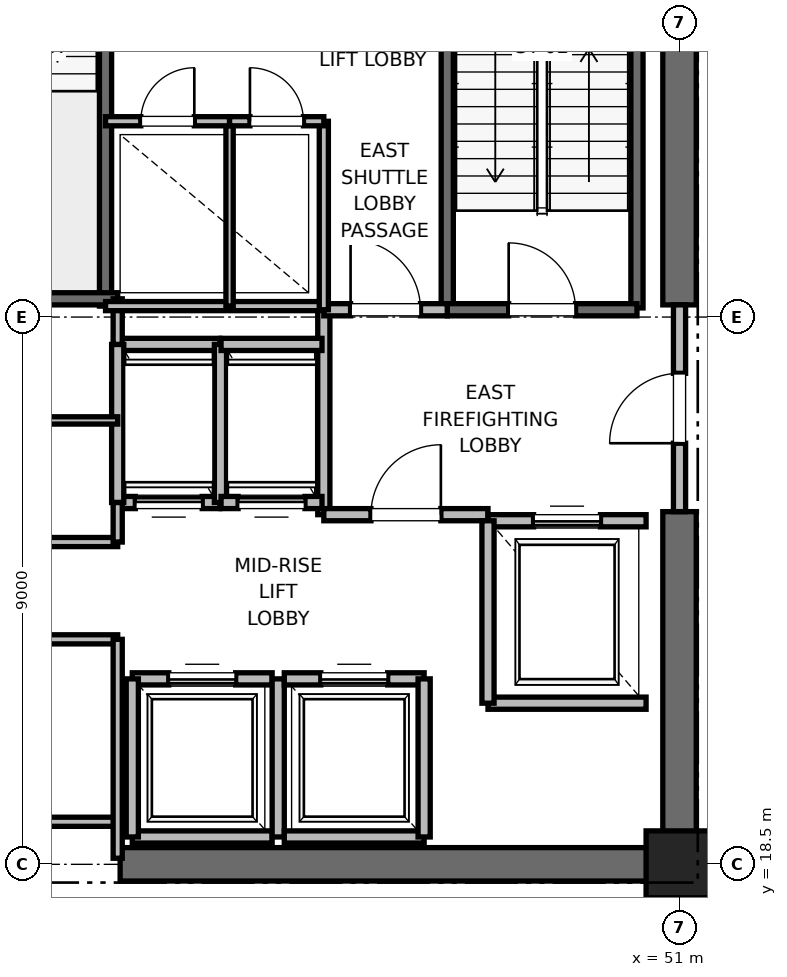
"""IFC4 building model, lengths in metres.
Left out: names, types, materials, properties, quantities, classifications, styles, units other than length and angle.
Written with IfcOpenShell. Run it as: python <this file> out.ifc"""

import sys

from ifc_helpers import new_model, si_unit, direction, frame, frame_2d, origin, origin_2d, place, context, subcontext, project, spatial, rectangle, extrude, element, fill, save


model = new_model("IFC4")
c1 = context("Model", 3, precision=1e-05, world=origin(), true_north=direction((0.0, 1.0)))
c2 = subcontext(c1, "Body", "Model", "MODEL_VIEW")
j1 = project(units=[si_unit("LENGTHUNIT", "METRE"), si_unit("PLANEANGLEUNIT", "RADIAN")], contexts=[c1])
p1 = place(None, origin())
s1 = spatial("IfcSite", under=j1, at=p1, CompositionType="ELEMENT")
p2 = place(p1, origin())
s2 = spatial("IfcBuilding", under=s1, at=p2, CompositionType="ELEMENT")
p3 = place(p2, frame((0.0, 0.0, 160.4)))
s3 = spatial("IfcBuildingStorey", under=s2, at=p3, CompositionType="ELEMENT", Elevation=160.4)
p4 = place(p3, frame((51.0, 18.5, 0.0), z_axis=(0.0, 0.0, 1.0), x_axis=(1.0, 0.0, 0.0)))
e1 = element("IfcColumn", 1, at=p4, inside=s3, PredefinedType="PILASTER", context=c2, shape_type="SweptSolid", body=[
    extrude(rectangle(XDim=1.1, YDim=1.1, at=origin_2d()), origin(), (0.0, 0.0, 1.0), 4.0),
])
p5 = place(p3, frame((41.8, 18.5, 0.0), z_axis=(0.0, 0.0, 1.0), x_axis=(1.0, 0.0, 0.0)))
e2 = element("IfcWall", 2, at=p5, inside=s3, PredefinedType="SHEAR", context=c2, shape_type="SweptSolid", body=[
    extrude(rectangle(XDim=9.2, YDim=0.55, at=frame_2d((4.6, 0.0))), origin(), (0.0, 0.0, 1.0), 3.775),
])
p6 = place(p3, frame((51.0, 18.5, 0.0), z_axis=(0.0, 0.0, 1.0), x_axis=(0.0, 1.0, 0.0)))
e3 = element("IfcWall", 3, at=p6, inside=s3, PredefinedType="SHEAR", context=c2, shape_type="SweptSolid", body=[
    extrude(rectangle(XDim=5.8, YDim=0.55, at=frame_2d((2.9, 0.0))), origin(), (0.0, 0.0, 1.0), 3.775),
])
p7 = place(p3, frame((51.0, 27.7, 0.0), z_axis=(0.0, 0.0, 1.0), x_axis=(0.0, 1.0, 0.0)))
e4 = element("IfcWall", 4, at=p7, inside=s3, PredefinedType="SHEAR", context=c2, shape_type="SweptSolid", body=[
    extrude(rectangle(XDim=8.8, YDim=0.55, at=frame_2d((4.4, 0.0))), origin(), (0.0, 0.0, 1.0), 3.775),
])
p8 = place(p3, frame((50.3, 27.65, 0.0), z_axis=(0.0, 0.0, 1.0), x_axis=(0.0, 1.0, 0.0)))
e5 = element("IfcWall", 5, at=p8, inside=s3, PredefinedType="SOLIDWALL", context=c2, shape_type="SweptSolid", body=[
    extrude(rectangle(XDim=8.15, YDim=0.2, at=frame_2d((4.075, 0.0))), origin(), (0.0, 0.0, 1.0), 3.775),
])
p9 = place(p3, frame((47.18, 27.62, 0.0), z_axis=(0.0, 0.0, 1.0), x_axis=(0.0, 1.0, 0.0)))
e6 = element("IfcWall", 6, at=p9, inside=s3, PredefinedType="SOLIDWALL", context=c2, shape_type="SweptSolid", body=[
    extrude(rectangle(XDim=8.18, YDim=0.2, at=frame_2d((4.09, 0.0))), origin(), (0.0, 0.0, 1.0), 3.775),
])
p10 = place(p3, frame((47.18, 27.62, 0.0), z_axis=(0.0, 0.0, 1.0), x_axis=(1.0, 0.0, 0.0)))
e7 = element("IfcWall", 7, at=p10, inside=s3, PredefinedType="SOLIDWALL", context=c2, shape_type="SweptSolid", body=[
    extrude(rectangle(XDim=3.12, YDim=0.2, at=frame_2d((1.56, 0.0))), origin(), (0.0, 0.0, 1.0), 3.775),
])
p11 = place(p10, frame((1.01, 0.0, 0.0)))
e8 = element("IfcOpeningElement", 8, at=p11, cuts=e7, PredefinedType="OPENING", context=c2, shape_type="SweptSolid", body=[
    extrude(rectangle(XDim=1.1, YDim=2.15, at=frame_2d((0.55, 1.075))), frame((0.0, 0.1, 0.0), z_axis=(0.0, -1.0, 0.0), x_axis=(1.0, 0.0, 0.0)), (0.0, 0.0, 1.0), 0.2),
])
p12 = place(p3, frame((41.56, 27.68, 0.0), z_axis=(0.0, 0.0, 1.0), x_axis=(0.0, 1.0, 0.0)))
e9 = element("IfcWall", 9, at=p12, inside=s3, PredefinedType="SOLIDWALL", context=c2, shape_type="SweptSolid", body=[
    extrude(rectangle(XDim=8.57, YDim=0.2, at=frame_2d((4.285, 0.0))), origin(), (0.0, 0.0, 1.0), 3.775),
])
p13 = place(p3, frame((38.44, 27.8, 0.0), z_axis=(0.0, 0.0, 1.0), x_axis=(1.0, 0.0, 0.0)))
e10 = element("IfcWall", 10, at=p13, inside=s3, PredefinedType="SOLIDWALL", context=c2, shape_type="SweptSolid", body=[
    extrude(rectangle(XDim=3.32, YDim=0.2, at=frame_2d((1.66, 0.0))), origin(), (0.0, 0.0, 1.0), 3.775),
])
p14 = place(p3, frame((45.15, 24.25, 0.0), z_axis=(0.0, 0.0, 1.0), x_axis=(0.0, 1.0, 0.0)))
e11 = element("IfcWall", 11, at=p14, inside=s3, PredefinedType="PARTITIONING", context=c2, shape_type="SweptSolid", body=[
    extrude(rectangle(XDim=3.37, YDim=0.2, at=frame_2d((1.685, 0.0))), origin(), (0.0, 0.0, 1.0), 3.775),
])
p15 = place(p3, frame((45.15, 24.25, 0.0), z_axis=(0.0, 0.0, 1.0), x_axis=(1.0, 0.0, 0.0)))
e12 = element("IfcWall", 12, at=p15, inside=s3, PredefinedType="PARTITIONING", context=c2, shape_type="SweptSolid", body=[
    extrude(rectangle(XDim=2.7, YDim=0.2, at=frame_2d((1.35, 0.0))), origin(), (0.0, 0.0, 1.0), 3.775),
])
p16 = place(p15, frame((0.775, 0.0, 0.0)))
e13 = element("IfcOpeningElement", 13, at=p16, cuts=e12, PredefinedType="OPENING", context=c2, shape_type="SweptSolid", body=[
    extrude(rectangle(XDim=1.15, YDim=2.2, at=frame_2d((0.575, 1.1))), frame((0.0, 0.1, 0.0), z_axis=(0.0, -1.0, 0.0), x_axis=(1.0, 0.0, 0.0)), (0.0, 0.0, 1.0), 0.2),
])
p17 = place(p3, frame((45.15, 27.62, 0.0), z_axis=(0.0, 0.0, 1.0), x_axis=(1.0, 0.0, 0.0)))
e14 = element("IfcWall", 14, at=p17, inside=s3, PredefinedType="PARTITIONING", context=c2, shape_type="SweptSolid", body=[
    extrude(rectangle(XDim=2.03, YDim=0.2, at=frame_2d((1.015, 0.0))), origin(), (0.0, 0.0, 1.0), 3.775),
])
p18 = place(p17, frame((0.44, 0.0, 0.0)))
e15 = element("IfcOpeningElement", 15, at=p18, cuts=e14, PredefinedType="OPENING", context=c2, shape_type="SweptSolid", body=[
    extrude(rectangle(XDim=1.15, YDim=2.2, at=frame_2d((0.575, 1.1))), frame((0.0, 0.1, 0.0), z_axis=(0.0, -1.0, 0.0), x_axis=(1.0, 0.0, 0.0)), (0.0, 0.0, 1.0), 0.2),
])
p19 = place(p3, frame((51.0, 24.3, 0.0), z_axis=(0.0, 0.0, 1.0), x_axis=(0.0, 1.0, 0.0)))
e16 = element("IfcWall", 16, at=p19, inside=s3, PredefinedType="PARTITIONING", context=c2, shape_type="SweptSolid", body=[
    extrude(rectangle(XDim=3.4, YDim=0.2, at=frame_2d((1.7, 0.0))), origin(), (0.0, 0.0, 1.0), 2.755),
])
p20 = place(p19, frame((1.125, 0.0, 0.0)))
e17 = element("IfcOpeningElement", 17, at=p20, cuts=e16, PredefinedType="OPENING", context=c2, shape_type="SweptSolid", body=[
    extrude(rectangle(XDim=1.15, YDim=2.2, at=frame_2d((0.575, 1.1))), frame((0.0, 0.1, 0.0), z_axis=(0.0, -1.0, 0.0), x_axis=(1.0, 0.0, 0.0)), (0.0, 0.0, 1.0), 0.2),
])
p21 = place(p3, frame((47.85, 21.15, 0.0), z_axis=(0.0, 0.0, 1.0), x_axis=(1.0, 0.0, 0.0)))
e18 = element("IfcWall", 18, at=p21, inside=s3, PredefinedType="SOLIDWALL", context=c2, shape_type="SweptSolid", body=[
    extrude(rectangle(XDim=2.6, YDim=0.2, at=frame_2d((1.3, 0.0))), origin(), (0.0, 0.0, 1.0), 3.775),
])
p22 = place(p3, frame((50.45, 24.15, 0.0), z_axis=(0.0, 0.0, 1.0), x_axis=(-1.0, 0.0, 0.0)))
e19 = element("IfcWall", 19, at=p22, inside=s3, PredefinedType="SOLIDWALL", context=c2, shape_type="SweptSolid", body=[
    extrude(rectangle(XDim=2.6, YDim=0.2, at=frame_2d((1.3, 0.0))), origin(), (0.0, 0.0, 1.0), 2.755),
])
p23 = place(p22, frame((0.75, 0.0, 0.0)))
e20 = element("IfcOpeningElement", 20, at=p23, cuts=e19, PredefinedType="OPENING", context=c2, shape_type="SweptSolid", body=[
    extrude(rectangle(XDim=1.1, YDim=2.2, at=frame_2d((0.55, 1.1))), frame((0.0, 0.1, 0.0), z_axis=(0.0, -1.0, 0.0), x_axis=(1.0, 0.0, 0.0)), (0.0, 0.0, 1.0), 0.2),
])
p24 = place(p3, frame((47.85, 24.15, 0.0), z_axis=(0.0, 0.0, 1.0), x_axis=(0.0, -1.0, 0.0)))
e21 = element("IfcWall", 21, at=p24, inside=s3, PredefinedType="SOLIDWALL", context=c2, shape_type="SweptSolid", body=[
    extrude(rectangle(XDim=3.0, YDim=0.2, at=frame_2d((1.5, 0.0))), origin(), (0.0, 0.0, 1.0), 3.775),
])
p25 = place(p3, frame((42.0, 18.95, 0.0), z_axis=(0.0, 0.0, 1.0), x_axis=(1.0, 0.0, 0.0)))
e22 = element("IfcWall", 22, at=p25, inside=s3, PredefinedType="SOLIDWALL", context=c2, shape_type="SweptSolid", body=[
    extrude(rectangle(XDim=2.3, YDim=0.2, at=frame_2d((1.15, 0.0))), origin(), (0.0, 0.0, 1.0), 2.755),
])
p26 = place(p3, frame((44.3, 21.55, 0.0), z_axis=(0.0, 0.0, 1.0), x_axis=(-1.0, 0.0, 0.0)))
e23 = element("IfcWall", 23, at=p26, inside=s3, PredefinedType="SOLIDWALL", context=c2, shape_type="SweptSolid", body=[
    extrude(rectangle(XDim=2.3, YDim=0.2, at=frame_2d((1.15, 0.0))), origin(), (0.0, 0.0, 1.0), 3.775),
])
p27 = place(p26, frame((0.6, 0.0, 0.0)))
e24 = element("IfcOpeningElement", 24, at=p27, cuts=e23, PredefinedType="OPENING", context=c2, shape_type="SweptSolid", body=[
    extrude(rectangle(XDim=1.1, YDim=2.2, at=frame_2d((0.55, 1.1))), frame((0.0, 0.1, 0.0), z_axis=(0.0, -1.0, 0.0), x_axis=(1.0, 0.0, 0.0)), (0.0, 0.0, 1.0), 0.2),
])
p28 = place(p3, frame((42.0, 21.55, 0.0), z_axis=(0.0, 0.0, 1.0), x_axis=(0.0, -1.0, 0.0)))
e25 = element("IfcWall", 25, at=p28, inside=s3, PredefinedType="SOLIDWALL", context=c2, shape_type="SweptSolid", body=[
    extrude(rectangle(XDim=2.6, YDim=0.2, at=frame_2d((1.3, 0.0))), origin(), (0.0, 0.0, 1.0), 2.755),
])
p29 = place(p3, frame((44.4, 18.95, 0.0), z_axis=(0.0, 0.0, 1.0), x_axis=(0.0, 1.0, 0.0)))
e26 = element("IfcWall", 26, at=p29, inside=s3, PredefinedType="SOLIDWALL", context=c2, shape_type="SweptSolid", body=[
    extrude(rectangle(XDim=2.6, YDim=0.2, at=frame_2d((1.3, 0.0))), origin(), (0.0, 0.0, 1.0), 3.775),
])
p30 = place(p3, frame((44.5, 18.95, 0.0), z_axis=(0.0, 0.0, 1.0), x_axis=(1.0, 0.0, 0.0)))
e27 = element("IfcWall", 27, at=p30, inside=s3, PredefinedType="SOLIDWALL", context=c2, shape_type="SweptSolid", body=[
    extrude(rectangle(XDim=2.3, YDim=0.2, at=frame_2d((1.15, 0.0))), origin(), (0.0, 0.0, 1.0), 3.775),
])
p31 = place(p3, frame((46.8, 21.55, 0.0), z_axis=(0.0, 0.0, 1.0), x_axis=(-1.0, 0.0, 0.0)))
e28 = element("IfcWall", 28, at=p31, inside=s3, PredefinedType="SOLIDWALL", context=c2, shape_type="SweptSolid", body=[
    extrude(rectangle(XDim=2.3, YDim=0.2, at=frame_2d((1.15, 0.0))), origin(), (0.0, 0.0, 1.0), 3.775),
])
p32 = place(p31, frame((0.6, 0.0, 0.0)))
e29 = element("IfcOpeningElement", 29, at=p32, cuts=e28, PredefinedType="OPENING", context=c2, shape_type="SweptSolid", body=[
    extrude(rectangle(XDim=1.1, YDim=2.2, at=frame_2d((0.55, 1.1))), frame((0.0, 0.1, 0.0), z_axis=(0.0, -1.0, 0.0), x_axis=(1.0, 0.0, 0.0)), (0.0, 0.0, 1.0), 0.2),
])
p33 = place(p3, frame((46.8, 18.95, 0.0), z_axis=(0.0, 0.0, 1.0), x_axis=(0.0, 1.0, 0.0)))
e30 = element("IfcWall", 30, at=p33, inside=s3, PredefinedType="SOLIDWALL", context=c2, shape_type="SweptSolid", body=[
    extrude(rectangle(XDim=2.6, YDim=0.2, at=frame_2d((1.3, 0.0))), origin(), (0.0, 0.0, 1.0), 3.775),
])
p34 = place(p3, frame((41.76, 24.45, 0.0), z_axis=(0.0, 0.0, 1.0), x_axis=(1.0, 0.0, 0.0)))
e31 = element("IfcWall", 31, at=p34, inside=s3, PredefinedType="SOLIDWALL", context=c2, shape_type="SweptSolid", body=[
    extrude(rectangle(XDim=1.68, YDim=0.2, at=frame_2d((0.84, 0.0))), origin(), (0.0, 0.0, 1.0), 3.775),
])
p35 = place(p34, frame((0.29, 0.0, 0.0)))
e32 = element("IfcOpeningElement", 32, at=p35, cuts=e31, PredefinedType="OPENING", context=c2, shape_type="SweptSolid", body=[
    extrude(rectangle(XDim=1.1, YDim=2.2, at=frame_2d((0.55, 1.1))), frame((0.0, 0.1, 0.0), z_axis=(0.0, -1.0, 0.0), x_axis=(1.0, 0.0, 0.0)), (0.0, 0.0, 1.0), 0.2),
])
p36 = place(p3, frame((43.44, 27.05, 0.0), z_axis=(0.0, 0.0, 1.0), x_axis=(-1.0, 0.0, 0.0)))
e33 = element("IfcWall", 33, at=p36, inside=s3, PredefinedType="SOLIDWALL", context=c2, shape_type="SweptSolid", body=[
    extrude(rectangle(XDim=1.68, YDim=0.2, at=frame_2d((0.84, 0.0))), origin(), (0.0, 0.0, 1.0), 3.775),
])
for number, where, z_axis, x_axis in (
    (34, (41.76, 27.05, 0.0), (0.0, 0.0, 1.0), (0.0, -1.0, 0.0)),
    (35, (43.45, 24.45, 0.0), (0.0, 0.0, 1.0), (0.0, 1.0, 0.0)),
):
    element("IfcWall", number, at=place(p3, frame(where, z_axis=z_axis, x_axis=x_axis)), inside=s3, PredefinedType="SOLIDWALL", context=c2, shape_type="SweptSolid", body=[
        extrude(rectangle(XDim=2.6, YDim=0.2, at=frame_2d((1.3, 0.0))), origin(), (0.0, 0.0, 1.0), 3.775),
    ])
p37 = place(p3, frame((43.46, 24.45, 0.0), z_axis=(0.0, 0.0, 1.0), x_axis=(1.0, 0.0, 0.0)))
e36 = element("IfcWall", 36, at=p37, inside=s3, PredefinedType="SOLIDWALL", context=c2, shape_type="SweptSolid", body=[
    extrude(rectangle(XDim=1.66, YDim=0.2, at=frame_2d((0.83, 0.0))), origin(), (0.0, 0.0, 1.0), 3.775),
])
p38 = place(p37, frame((0.28, 0.0, 0.0)))
e37 = element("IfcOpeningElement", 37, at=p38, cuts=e36, PredefinedType="OPENING", context=c2, shape_type="SweptSolid", body=[
    extrude(rectangle(XDim=1.1, YDim=2.2, at=frame_2d((0.55, 1.1))), frame((0.0, 0.1, 0.0), z_axis=(0.0, -1.0, 0.0), x_axis=(1.0, 0.0, 0.0)), (0.0, 0.0, 1.0), 0.2),
])
p39 = place(p3, frame((45.12, 27.05, 0.0), z_axis=(0.0, 0.0, 1.0), x_axis=(-1.0, 0.0, 0.0)))
e38 = element("IfcWall", 38, at=p39, inside=s3, PredefinedType="SOLIDWALL", context=c2, shape_type="SweptSolid", body=[
    extrude(rectangle(XDim=1.66, YDim=0.2, at=frame_2d((0.83, 0.0))), origin(), (0.0, 0.0, 1.0), 3.775),
])
for number, where, z_axis, x_axis in (
    (39, (39.95, 19.2, 0.0), (0.0, 0.0, 1.0), (1.0, 0.0, 0.0)),
    (40, (39.95, 22.2, 0.0), (0.0, 0.0, 1.0), (1.0, 0.0, 0.0)),
    (41, (39.95, 23.8, 0.0), (0.0, 0.0, 1.0), (1.0, 0.0, 0.0)),
):
    element("IfcWall", number, at=place(p3, frame(where, z_axis=z_axis, x_axis=x_axis)), inside=s3, PredefinedType="PARTITIONING", context=c2, shape_type="SweptSolid", body=[
        extrude(rectangle(XDim=1.81, YDim=0.15, at=frame_2d((0.905, 0.0))), origin(), (0.0, 0.0, 1.0), 2.85),
    ])
p40 = place(p3, frame((39.95, 25.8, 0.0), z_axis=(0.0, 0.0, 1.0), x_axis=(1.0, 0.0, 0.0)))
e42 = element("IfcWall", 42, at=p40, inside=s3, PredefinedType="PARTITIONING", context=c2, shape_type="SweptSolid", body=[
    extrude(rectangle(XDim=1.81, YDim=0.12, at=frame_2d((0.905, 0.0))), origin(), (0.0, 0.0, 1.0), 2.85),
])
p41 = place(p3, frame((41.76, 18.6, 0.0), z_axis=(0.0, 0.0, 1.0), x_axis=(0.0, 1.0, 0.0)))
e43 = element("IfcWall", 43, at=p41, inside=s3, PredefinedType="PARTITIONING", context=c2, shape_type="SweptSolid", body=[
    extrude(rectangle(XDim=3.6, YDim=0.15, at=frame_2d((1.8, 0.0))), origin(), (0.0, 0.0, 1.0), 2.755),
])
p42 = place(p3, frame((41.76, 23.8, 0.0), z_axis=(0.0, 0.0, 1.0), x_axis=(0.0, 1.0, 0.0)))
e44 = element("IfcWall", 44, at=p42, inside=s3, PredefinedType="PARTITIONING", context=c2, shape_type="SweptSolid", body=[
    extrude(rectangle(XDim=0.65, YDim=0.15, at=frame_2d((0.325, 0.0))), origin(), (0.0, 0.0, 1.0), 2.85),
])
p43 = place(p3, frame((41.76, 27.05, 0.0), z_axis=(0.0, 0.0, 1.0), x_axis=(0.0, 1.0, 0.0)))
e45 = element("IfcWall", 45, at=p43, inside=s3, PredefinedType="PARTITIONING", context=c2, shape_type="SweptSolid", body=[
    extrude(rectangle(XDim=0.75, YDim=0.15, at=frame_2d((0.375, 0.0))), origin(), (0.0, 0.0, 1.0), 2.85),
])
p44 = place(p3, frame((41.56, 27.68, 0.0), z_axis=(0.0, 0.0, 1.0), x_axis=(1.0, 0.0, 0.0)))
e46 = element("IfcWall", 46, at=p44, inside=s3, PredefinedType="PARTITIONING", context=c2, shape_type="SweptSolid", body=[
    extrude(rectangle(XDim=3.59, YDim=0.15, at=frame_2d((1.795, 0.0))), origin(), (0.0, 0.0, 1.0), 2.85),
])
p45 = place(p3, frame((45.15, 27.62, 0.0), z_axis=(0.0, 0.0, 1.0), x_axis=(0.0, 1.0, 0.0)))
e47 = element("IfcWall", 47, at=p45, inside=s3, PredefinedType="PARTITIONING", context=c2, shape_type="SweptSolid", body=[
    extrude(rectangle(XDim=3.1, YDim=0.15, at=frame_2d((1.55, 0.0))), origin(), (0.0, 0.0, 1.0), 2.85),
])
p46 = place(p3, frame((43.6, 27.68, 0.0), z_axis=(0.0, 0.0, 1.0), x_axis=(0.0, 1.0, 0.0)))
e48 = element("IfcWall", 48, at=p46, inside=s3, PredefinedType="PARTITIONING", context=c2, shape_type="SweptSolid", body=[
    extrude(rectangle(XDim=3.04, YDim=0.12, at=frame_2d((1.52, 0.0))), origin(), (0.0, 0.0, 1.0), 2.85),
])
p47 = place(p3, frame((41.56, 30.72, 0.0), z_axis=(0.0, 0.0, 1.0), x_axis=(1.0, 0.0, 0.0)))
e49 = element("IfcWall", 49, at=p47, inside=s3, PredefinedType="PARTITIONING", context=c2, shape_type="SweptSolid", body=[
    extrude(rectangle(XDim=2.04, YDim=0.15, at=frame_2d((1.02, 0.0))), origin(), (0.0, 0.0, 1.0), 2.85),
])
p48 = place(p47, frame((0.58, 0.0, 0.0)))
e50 = element("IfcOpeningElement", 50, at=p48, cuts=e49, PredefinedType="OPENING", context=c2, shape_type="SweptSolid", body=[
    extrude(rectangle(XDim=0.88, YDim=2.1, at=frame_2d((0.44, 1.05))), frame((0.0, 0.075, 0.0), z_axis=(0.0, -1.0, 0.0), x_axis=(1.0, 0.0, 0.0)), (0.0, 0.0, 1.0), 0.15),
])
p49 = place(p3, frame((43.6, 30.72, 0.0), z_axis=(0.0, 0.0, 1.0), x_axis=(1.0, 0.0, 0.0)))
e51 = element("IfcWall", 51, at=p49, inside=s3, PredefinedType="PARTITIONING", context=c2, shape_type="SweptSolid", body=[
    extrude(rectangle(XDim=1.55, YDim=0.15, at=frame_2d((0.775, 0.0))), origin(), (0.0, 0.0, 1.0), 2.85),
])
p50 = place(p49, frame((0.335, 0.0, 0.0)))
e52 = element("IfcOpeningElement", 52, at=p50, cuts=e51, PredefinedType="OPENING", context=c2, shape_type="SweptSolid", body=[
    extrude(rectangle(XDim=0.88, YDim=2.1, at=frame_2d((0.44, 1.05))), frame((0.0, 0.075, 0.0), z_axis=(0.0, -1.0, 0.0), x_axis=(1.0, 0.0, 0.0)), (0.0, 0.0, 1.0), 0.15),
])
p51 = place(p11, origin())
e53 = element("IfcDoor", 53, at=p51, inside=s3, OperationType="SINGLE_SWING_LEFT", PredefinedType="DOOR", context=c2, shape_type="SweptSolid", body=[
    extrude(rectangle(XDim=1.1, YDim=2.15, at=frame_2d((0.55, 1.075))), frame((0.0, 0.025, 0.0), z_axis=(0.0, -1.0, 0.0), x_axis=(1.0, 0.0, 0.0)), (0.0, 0.0, 1.0), 0.05),
])
fill(e8, e53)
p52 = place(p16, origin())
e54 = element("IfcDoor", 54, at=p52, inside=s3, OperationType="SINGLE_SWING_RIGHT", PredefinedType="DOOR", context=c2, shape_type="SweptSolid", body=[
    extrude(rectangle(XDim=1.15, YDim=2.2, at=frame_2d((0.575, 1.1))), frame((0.0, 0.025, 0.0), z_axis=(0.0, -1.0, 0.0), x_axis=(1.0, 0.0, 0.0)), (0.0, 0.0, 1.0), 0.05),
])
fill(e13, e54)
p53 = place(p18, origin())
e55 = element("IfcDoor", 55, at=p53, inside=s3, OperationType="SINGLE_SWING_LEFT", PredefinedType="DOOR", context=c2, shape_type="SweptSolid", body=[
    extrude(rectangle(XDim=1.15, YDim=2.2, at=frame_2d((0.575, 1.1))), frame((0.0, 0.025, 0.0), z_axis=(0.0, -1.0, 0.0), x_axis=(1.0, 0.0, 0.0)), (0.0, 0.0, 1.0), 0.05),
])
fill(e15, e55)
p54 = place(p20, origin())
e56 = element("IfcDoor", 56, at=p54, inside=s3, OperationType="SINGLE_SWING_LEFT", PredefinedType="DOOR", context=c2, shape_type="SweptSolid", body=[
    extrude(rectangle(XDim=1.15, YDim=2.2, at=frame_2d((0.575, 1.1))), frame((0.0, 0.025, 0.0), z_axis=(0.0, -1.0, 0.0), x_axis=(1.0, 0.0, 0.0)), (0.0, 0.0, 1.0), 0.05),
])
fill(e17, e56)
p55 = place(p23, origin())
e57 = element("IfcDoor", 57, at=p55, inside=s3, OperationType="SLIDING_TO_RIGHT", PredefinedType="DOOR", context=c2, shape_type="SweptSolid", body=[
    extrude(rectangle(XDim=1.1, YDim=2.2, at=frame_2d((0.55, 1.1))), frame((0.0, 0.025, 0.0), z_axis=(0.0, -1.0, 0.0), x_axis=(1.0, 0.0, 0.0)), (0.0, 0.0, 1.0), 0.05),
])
fill(e20, e57)
p56 = place(p27, origin())
e58 = element("IfcDoor", 58, at=p56, inside=s3, OperationType="SLIDING_TO_RIGHT", PredefinedType="DOOR", context=c2, shape_type="SweptSolid", body=[
    extrude(rectangle(XDim=1.1, YDim=2.2, at=frame_2d((0.55, 1.1))), frame((0.0, 0.025, 0.0), z_axis=(0.0, -1.0, 0.0), x_axis=(1.0, 0.0, 0.0)), (0.0, 0.0, 1.0), 0.05),
])
fill(e24, e58)
p57 = place(p32, origin())
e59 = element("IfcDoor", 59, at=p57, inside=s3, OperationType="SLIDING_TO_RIGHT", PredefinedType="DOOR", context=c2, shape_type="SweptSolid", body=[
    extrude(rectangle(XDim=1.1, YDim=2.2, at=frame_2d((0.55, 1.1))), frame((0.0, 0.025, 0.0), z_axis=(0.0, -1.0, 0.0), x_axis=(1.0, 0.0, 0.0)), (0.0, 0.0, 1.0), 0.05),
])
fill(e29, e59)
p58 = place(p35, origin())
e60 = element("IfcDoor", 60, at=p58, inside=s3, OperationType="SLIDING_TO_RIGHT", PredefinedType="DOOR", context=c2, shape_type="SweptSolid", body=[
    extrude(rectangle(XDim=1.1, YDim=2.2, at=frame_2d((0.55, 1.1))), frame((0.0, 0.025, 0.0), z_axis=(0.0, -1.0, 0.0), x_axis=(1.0, 0.0, 0.0)), (0.0, 0.0, 1.0), 0.05),
])
fill(e32, e60)
p59 = place(p38, origin())
e61 = element("IfcDoor", 61, at=p59, inside=s3, OperationType="SLIDING_TO_RIGHT", PredefinedType="DOOR", context=c2, shape_type="SweptSolid", body=[
    extrude(rectangle(XDim=1.1, YDim=2.2, at=frame_2d((0.55, 1.1))), frame((0.0, 0.025, 0.0), z_axis=(0.0, -1.0, 0.0), x_axis=(1.0, 0.0, 0.0)), (0.0, 0.0, 1.0), 0.05),
])
fill(e37, e61)
p60 = place(p48, origin())
e62 = element("IfcDoor", 62, at=p60, inside=s3, OperationType="SINGLE_SWING_RIGHT", PredefinedType="DOOR", context=c2, shape_type="SweptSolid", body=[
    extrude(rectangle(XDim=0.88, YDim=2.1, at=frame_2d((0.44, 1.05))), frame((0.0, 0.025, 0.0), z_axis=(0.0, -1.0, 0.0), x_axis=(1.0, 0.0, 0.0)), (0.0, 0.0, 1.0), 0.05),
])
fill(e50, e62)
p61 = place(p50, origin())
e63 = element("IfcDoor", 63, at=p61, inside=s3, OperationType="SINGLE_SWING_LEFT", PredefinedType="DOOR", context=c2, shape_type="SweptSolid", body=[
    extrude(rectangle(XDim=0.88, YDim=2.1, at=frame_2d((0.44, 1.05))), frame((0.0, 0.025, 0.0), z_axis=(0.0, -1.0, 0.0), x_axis=(1.0, 0.0, 0.0)), (0.0, 0.0, 1.0), 0.05),
])
fill(e52, e63)
save(model, sys.argv[1])
